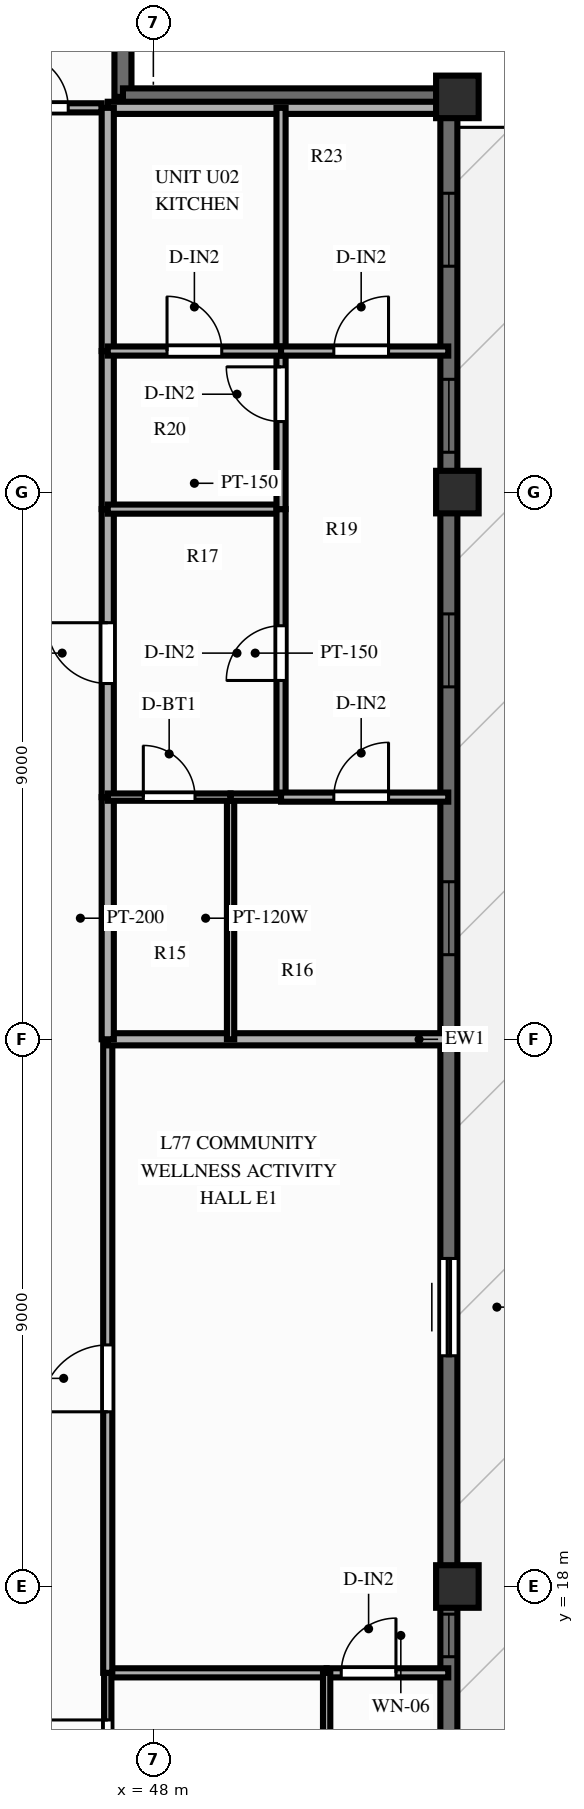
"""IFC4 building model, lengths in metres.
Left out: names, types, materials, properties, quantities, classifications, styles, units other than length and angle.
Written with IfcOpenShell. Run it as: python <this file> out.ifc"""

import sys

from ifc_helpers import new_model, si_unit, direction, frame, frame_2d, origin, origin_2d, place, context, subcontext, project, spatial, rectangle, extrude, source, transform, mapped, element, fill, save


model = new_model("IFC4")
c1 = context("Model", 3, precision=1e-05, world=origin(), true_north=direction((0.0, 1.0)))
c2 = subcontext(c1, "Body", "Model", "MODEL_VIEW")
j1 = project(units=[si_unit("LENGTHUNIT", "METRE"), si_unit("PLANEANGLEUNIT", "RADIAN")], contexts=[c1])
p1 = place(None, origin())
s1 = spatial("IfcSite", under=j1, at=p1, CompositionType="ELEMENT")
p2 = place(p1, origin())
s2 = spatial("IfcBuilding", under=s1, at=p2, CompositionType="ELEMENT")
p3 = place(p2, frame((0.0, 0.0, 249.0)))
s3 = spatial("IfcBuildingStorey", under=s2, at=p3, CompositionType="ELEMENT", Elevation=249.0)
m1 = source(origin(), c2, "Body", "SweptSolid", [
    extrude(rectangle(XDim=0.7, YDim=0.7, at=origin_2d()), origin(), (0.0, 0.0, 1.0), 3.2),
])
for number, where, z_axis, x_axis in (
    (1, (53.0, 18.0, 0.0), (0.0, 0.0, 1.0), (1.0, 0.0, 0.0)),
    (2, (53.0, 36.0, 0.0), (0.0, 0.0, 1.0), (1.0, 0.0, 0.0)),
    (3, (53.0, 42.5, 0.0), (0.0, 0.0, 1.0), (1.0, 0.0, 0.0)),
):
    element("IfcColumn", number, at=place(p3, frame(where, z_axis=z_axis, x_axis=x_axis)), inside=s3, PredefinedType="COLUMN", context=c2, shape_type="MappedRepresentation", body=[
        mapped(m1, transform((0.0, 0.0, 0.0), scale=1.0)),
    ])
p4 = place(p3, frame((52.86, 11.5, 0.0), z_axis=(0.0, 0.0, 1.0), x_axis=(0.0, 1.0, 0.0)))
e4 = element("IfcWall", 4, at=p4, inside=s3, PredefinedType="SOLIDWALL", context=c2, shape_type="SweptSolid", body=[
    extrude(rectangle(XDim=31.0, YDim=0.28, at=frame_2d((15.5, 0.0))), origin(), (0.0, 0.0, 1.0), 2.48),
])
p5 = place(p4, frame((2.035, 0.0, 0.25)))
e5 = element("IfcOpeningElement", 5, at=p5, cuts=e4, PredefinedType="OPENING", context=c2, shape_type="SweptSolid", body=[
    extrude(rectangle(XDim=1.2, YDim=1.5, at=frame_2d((0.6, 0.75))), frame((0.0, 0.152, 0.0), z_axis=(0.0, -1.0, 0.0), x_axis=(1.0, 0.0, 0.0)), (0.0, 0.0, 1.0), 0.304),
])
p6 = place(p4, frame((5.345, 0.0, 0.25)))
e6 = element("IfcOpeningElement", 6, at=p6, cuts=e4, PredefinedType="OPENING", context=c2, shape_type="SweptSolid", body=[
    extrude(rectangle(XDim=0.7, YDim=1.5, at=frame_2d((0.35, 0.75))), frame((0.0, 0.152, 0.0), z_axis=(0.0, -1.0, 0.0), x_axis=(1.0, 0.0, 0.0)), (0.0, 0.0, 1.0), 0.304),
])
p7 = place(p4, frame((11.895, 0.0, 0.0), z_axis=(0.0, 0.0, 1.0), x_axis=(-1.0, 0.0, 0.0)))
e7 = element("IfcOpeningElement", 7, at=p7, cuts=e4, PredefinedType="OPENING", context=c2, shape_type="SweptSolid", body=[
    extrude(rectangle(XDim=1.6, YDim=2.15, at=frame_2d((0.8, 1.075))), frame((0.0, 0.152, 0.0), z_axis=(0.0, -1.0, 0.0), x_axis=(1.0, 0.0, 0.0)), (0.0, 0.0, 1.0), 0.304),
])
p8 = place(p4, frame((16.892, 0.0, 0.25)))
e8 = element("IfcOpeningElement", 8, at=p8, cuts=e4, PredefinedType="OPENING", context=c2, shape_type="SweptSolid", body=[
    extrude(rectangle(XDim=1.2, YDim=1.5, at=frame_2d((0.6, 0.75))), frame((0.0, 0.152, 0.0), z_axis=(0.0, -1.0, 0.0), x_axis=(1.0, 0.0, 0.0)), (0.0, 0.0, 1.0), 0.304),
])
p9 = place(p4, frame((21.297, 0.0, 0.25)))
e9 = element("IfcOpeningElement", 9, at=p9, cuts=e4, PredefinedType="OPENING", context=c2, shape_type="SweptSolid", body=[
    extrude(rectangle(XDim=1.2, YDim=1.5, at=frame_2d((0.6, 0.75))), frame((0.0, 0.152, 0.0), z_axis=(0.0, -1.0, 0.0), x_axis=(1.0, 0.0, 0.0)), (0.0, 0.0, 1.0), 0.304),
])
p10 = place(p4, frame((25.155, 0.0, 0.25)))
e10 = element("IfcOpeningElement", 10, at=p10, cuts=e4, PredefinedType="OPENING", context=c2, shape_type="SweptSolid", body=[
    extrude(rectangle(XDim=1.2, YDim=1.5, at=frame_2d((0.6, 0.75))), frame((0.0, 0.152, 0.0), z_axis=(0.0, -1.0, 0.0), x_axis=(1.0, 0.0, 0.0)), (0.0, 0.0, 1.0), 0.304),
])
p11 = place(p4, frame((28.215, 0.0, 0.25)))
e11 = element("IfcOpeningElement", 11, at=p11, cuts=e4, PredefinedType="OPENING", context=c2, shape_type="SweptSolid", body=[
    extrude(rectangle(XDim=1.2, YDim=1.5, at=frame_2d((0.6, 0.75))), frame((0.0, 0.152, 0.0), z_axis=(0.0, -1.0, 0.0), x_axis=(1.0, 0.0, 0.0)), (0.0, 0.0, 1.0), 0.304),
])
for number, where, z_axis, x_axis in (
    (12, (47.5, 42.5, 0.0), (0.0, 0.0, 1.0), (0.0, 1.0, 0.0)),
    (13, (47.5, 42.5, 0.0), (0.0, 0.0, 1.0), (1.0, 0.0, 0.0)),
):
    element("IfcWall", number, at=place(p3, frame(where, z_axis=z_axis, x_axis=x_axis)), inside=s3, PredefinedType="SOLIDWALL", context=c2, shape_type="SweptSolid", body=[
        extrude(rectangle(XDim=5.42, YDim=0.28, at=frame_2d((2.71, 0.0))), origin(), (0.0, 0.0, 1.0), 2.48),
    ])
p12 = place(p3, frame((44.82, 42.32, 0.0), z_axis=(0.0, 0.0, 1.0), x_axis=(1.0, 0.0, 0.0)))
e14 = element("IfcWall", 14, at=p12, inside=s3, PredefinedType="PARTITIONING", context=c2, shape_type="SweptSolid", body=[
    extrude(rectangle(XDim=2.33, YDim=0.15, at=frame_2d((1.165, 0.0))), origin(), (0.0, 0.0, 1.0), 2.88),
])
p13 = place(p12, frame((0.88, 0.0, 0.0)))
e15 = element("IfcOpeningElement", 15, at=p13, cuts=e14, PredefinedType="OPENING", context=c2, shape_type="SweptSolid", body=[
    extrude(rectangle(XDim=0.9, YDim=2.1, at=frame_2d((0.45, 1.05))), frame((0.0, 0.087, 0.0), z_axis=(0.0, -1.0, 0.0), x_axis=(1.0, 0.0, 0.0)), (0.0, 0.0, 1.0), 0.174),
])
p14 = place(p3, frame((47.25, 42.32, 0.0), z_axis=(0.0, 0.0, 1.0), x_axis=(1.0, 0.0, 0.0)))
e16 = element("IfcWall", 16, at=p14, inside=s3, PredefinedType="PARTITIONING", context=c2, shape_type="SweptSolid", body=[
    extrude(rectangle(XDim=5.6, YDim=0.2, at=frame_2d((2.8, 0.0))), origin(), (0.0, 0.0, 1.0), 2.88),
])
p15 = place(p3, frame((47.25, 16.58, 0.0), z_axis=(0.0, 0.0, 1.0), x_axis=(1.0, 0.0, 0.0)))
e17 = element("IfcWall", 17, at=p15, inside=s3, PredefinedType="PARTITIONING", context=c2, shape_type="SweptSolid", body=[
    extrude(rectangle(XDim=3.6, YDim=0.15, at=frame_2d((1.8, 0.0))), origin(), (0.0, 0.0, 1.0), 2.88),
])
p16 = place(p3, frame((50.85, 16.58, 0.0), z_axis=(0.0, 0.0, 1.0), x_axis=(1.0, 0.0, 0.0)))
e18 = element("IfcWall", 18, at=p16, inside=s3, PredefinedType="PARTITIONING", context=c2, shape_type="SweptSolid", body=[
    extrude(rectangle(XDim=2.0, YDim=0.15, at=frame_2d((1.0, 0.0))), origin(), (0.0, 0.0, 1.0), 2.88),
])
p17 = place(p16, frame((0.24, 0.0, 0.0)))
e19 = element("IfcOpeningElement", 19, at=p17, cuts=e18, PredefinedType="OPENING", context=c2, shape_type="SweptSolid", body=[
    extrude(rectangle(XDim=0.9, YDim=2.1, at=frame_2d((0.45, 1.05))), frame((0.0, 0.087, 0.0), z_axis=(0.0, -1.0, 0.0), x_axis=(1.0, 0.0, 0.0)), (0.0, 0.0, 1.0), 0.174),
])
p18 = place(p3, frame((50.85, 11.68, 0.0), z_axis=(0.0, 0.0, 1.0), x_axis=(0.0, 1.0, 0.0)))
e20 = element("IfcWall", 20, at=p18, inside=s3, PredefinedType="PARTITIONING", context=c2, shape_type="SweptSolid", body=[
    extrude(rectangle(XDim=4.9, YDim=0.12, at=frame_2d((2.45, 0.0))), origin(), (0.0, 0.0, 1.0), 2.88),
])
p19 = place(p3, frame((47.25, 14.03, 0.0), z_axis=(0.0, 0.0, 1.0), x_axis=(0.0, 1.0, 0.0)))
e21 = element("IfcWall", 21, at=p19, inside=s3, PredefinedType="PARTITIONING", context=c2, shape_type="SweptSolid", body=[
    extrude(rectangle(XDim=2.55, YDim=0.12, at=frame_2d((1.275, 0.0))), origin(), (0.0, 0.0, 1.0), 2.88),
])
p20 = place(p19, frame((0.775, 0.0, 0.0)))
e22 = element("IfcOpeningElement", 22, at=p20, cuts=e21, PredefinedType="OPENING", context=c2, shape_type="SweptSolid", body=[
    extrude(rectangle(XDim=1.0, YDim=2.1, at=frame_2d((0.5, 1.05))), frame((0.0, 0.072, 0.0), z_axis=(0.0, -1.0, 0.0), x_axis=(1.0, 0.0, 0.0)), (0.0, 0.0, 1.0), 0.144),
])
p21 = place(p3, frame((47.25, 16.58, 0.0), z_axis=(0.0, 0.0, 1.0), x_axis=(0.0, 1.0, 0.0)))
e23 = element("IfcWall", 23, at=p21, inside=s3, PredefinedType="PARTITIONING", context=c2, shape_type="SweptSolid", body=[
    extrude(rectangle(XDim=10.42, YDim=0.15, at=frame_2d((5.21, 0.0))), origin(), (0.0, 0.0, 1.0), 2.88),
])
p22 = place(p21, frame((4.293, 0.0, 0.0)))
e24 = element("IfcOpeningElement", 24, at=p22, cuts=e23, PredefinedType="OPENING", context=c2, shape_type="SweptSolid", body=[
    extrude(rectangle(XDim=1.1, YDim=2.15, at=frame_2d((0.55, 1.075))), frame((0.0, 0.087, 0.0), z_axis=(0.0, -1.0, 0.0), x_axis=(1.0, 0.0, 0.0)), (0.0, 0.0, 1.0), 0.174),
])
p23 = place(p3, frame((47.25, 27.0, 0.0), z_axis=(0.0, 0.0, 1.0), x_axis=(1.0, 0.0, 0.0)))
e25 = element("IfcWall", 25, at=p23, inside=s3, PredefinedType="PARTITIONING", context=c2, shape_type="SweptSolid", body=[
    extrude(rectangle(XDim=5.6, YDim=0.2, at=frame_2d((2.8, 0.0))), origin(), (0.0, 0.0, 1.0), 2.88),
])
p24 = place(p3, frame((47.25, 27.0, 0.0), z_axis=(0.0, 0.0, 1.0), x_axis=(0.0, 1.0, 0.0)))
e26 = element("IfcWall", 26, at=p24, inside=s3, PredefinedType="PARTITIONING", context=c2, shape_type="SweptSolid", body=[
    extrude(rectangle(XDim=3.983, YDim=0.2, at=frame_2d((1.992, 0.0))), origin(), (0.0, 0.0, 1.0), 2.88),
])
p25 = place(p3, frame((47.25, 30.983, 0.0), z_axis=(0.0, 0.0, 1.0), x_axis=(0.0, 1.0, 0.0)))
e27 = element("IfcWall", 27, at=p25, inside=s3, PredefinedType="PARTITIONING", context=c2, shape_type="SweptSolid", body=[
    extrude(rectangle(XDim=4.737, YDim=0.2, at=frame_2d((2.368, 0.0))), origin(), (0.0, 0.0, 1.0), 2.88),
])
p26 = place(p25, frame((1.868, 0.0, 0.0)))
e28 = element("IfcOpeningElement", 28, at=p26, cuts=e27, PredefinedType="OPENING", context=c2, shape_type="SweptSolid", body=[
    extrude(rectangle(XDim=1.0, YDim=2.15, at=frame_2d((0.5, 1.075))), frame((0.0, 0.112, 0.0), z_axis=(0.0, -1.0, 0.0), x_axis=(1.0, 0.0, 0.0)), (0.0, 0.0, 1.0), 0.224),
])
p27 = place(p3, frame((47.25, 35.72, 0.0), z_axis=(0.0, 0.0, 1.0), x_axis=(0.0, 1.0, 0.0)))
e29 = element("IfcWall", 29, at=p27, inside=s3, PredefinedType="PARTITIONING", context=c2, shape_type="SweptSolid", body=[
    extrude(rectangle(XDim=2.6, YDim=0.2, at=frame_2d((1.3, 0.0))), origin(), (0.0, 0.0, 1.0), 2.88),
])
p28 = place(p3, frame((47.25, 35.72, 0.0), z_axis=(0.0, 0.0, 1.0), x_axis=(1.0, 0.0, 0.0)))
e30 = element("IfcWall", 30, at=p28, inside=s3, PredefinedType="PARTITIONING", context=c2, shape_type="SweptSolid", body=[
    extrude(rectangle(XDim=2.85, YDim=0.15, at=frame_2d((1.425, 0.0))), origin(), (0.0, 0.0, 1.0), 2.88),
])
p29 = place(p3, frame((50.1, 30.983, 0.0), z_axis=(0.0, 0.0, 1.0), x_axis=(0.0, 1.0, 0.0)))
e31 = element("IfcWall", 31, at=p29, inside=s3, PredefinedType="PARTITIONING", context=c2, shape_type="SweptSolid", body=[
    extrude(rectangle(XDim=4.737, YDim=0.15, at=frame_2d((2.368, 0.0))), origin(), (0.0, 0.0, 1.0), 2.88),
])
p30 = place(p29, frame((1.918, 0.0, 0.0)))
e32 = element("IfcOpeningElement", 32, at=p30, cuts=e31, PredefinedType="OPENING", context=c2, shape_type="SweptSolid", body=[
    extrude(rectangle(XDim=0.9, YDim=2.1, at=frame_2d((0.45, 1.05))), frame((0.0, 0.087, 0.0), z_axis=(0.0, -1.0, 0.0), x_axis=(1.0, 0.0, 0.0)), (0.0, 0.0, 1.0), 0.174),
])
p31 = place(p3, frame((50.1, 35.72, 0.0), z_axis=(0.0, 0.0, 1.0), x_axis=(0.0, 1.0, 0.0)))
e33 = element("IfcWall", 33, at=p31, inside=s3, PredefinedType="PARTITIONING", context=c2, shape_type="SweptSolid", body=[
    extrude(rectangle(XDim=2.6, YDim=0.15, at=frame_2d((1.3, 0.0))), origin(), (0.0, 0.0, 1.0), 2.88),
])
p32 = place(p31, frame((1.44, 0.0, 0.0)))
e34 = element("IfcOpeningElement", 34, at=p32, cuts=e33, PredefinedType="OPENING", context=c2, shape_type="SweptSolid", body=[
    extrude(rectangle(XDim=0.9, YDim=2.1, at=frame_2d((0.45, 1.05))), frame((0.0, 0.087, 0.0), z_axis=(0.0, -1.0, 0.0), x_axis=(1.0, 0.0, 0.0)), (0.0, 0.0, 1.0), 0.174),
])
p33 = place(p3, frame((47.25, 38.32, 0.0), z_axis=(0.0, 0.0, 1.0), x_axis=(0.0, 1.0, 0.0)))
e35 = element("IfcWall", 35, at=p33, inside=s3, PredefinedType="PARTITIONING", context=c2, shape_type="SweptSolid", body=[
    extrude(rectangle(XDim=4.0, YDim=0.2, at=frame_2d((2.0, 0.0))), origin(), (0.0, 0.0, 1.0), 2.88),
])
p34 = place(p3, frame((49.27, 27.0, 0.0), z_axis=(0.0, 0.0, 1.0), x_axis=(0.0, 1.0, 0.0)))
e36 = element("IfcWall", 36, at=p34, inside=s3, PredefinedType="PARTITIONING", context=c2, shape_type="SweptSolid", body=[
    extrude(rectangle(XDim=3.983, YDim=0.12, at=frame_2d((1.992, 0.0))), origin(), (0.0, 0.0, 1.0), 2.59),
])
p35 = place(p3, frame((50.1, 38.32, 0.0), z_axis=(0.0, 0.0, 1.0), x_axis=(0.0, 1.0, 0.0)))
e37 = element("IfcWall", 37, at=p35, inside=s3, PredefinedType="PARTITIONING", context=c2, shape_type="SweptSolid", body=[
    extrude(rectangle(XDim=4.0, YDim=0.15, at=frame_2d((2.0, 0.0))), origin(), (0.0, 0.0, 1.0), 2.88),
])
p36 = place(p3, frame((47.25, 30.983, 0.0), z_axis=(0.0, 0.0, 1.0), x_axis=(1.0, 0.0, 0.0)))
e38 = element("IfcWall", 38, at=p36, inside=s3, PredefinedType="PARTITIONING", context=c2, shape_type="SweptSolid", body=[
    extrude(rectangle(XDim=2.02, YDim=0.12, at=frame_2d((1.01, 0.0))), origin(), (0.0, 0.0, 1.0), 2.88),
])
p37 = place(p36, frame((0.585, 0.0, 0.0)))
e39 = element("IfcOpeningElement", 39, at=p37, cuts=e38, PredefinedType="OPENING", context=c2, shape_type="SweptSolid", body=[
    extrude(rectangle(XDim=0.85, YDim=2.05, at=frame_2d((0.425, 1.025))), frame((0.0, 0.072, 0.0), z_axis=(0.0, -1.0, 0.0), x_axis=(1.0, 0.0, 0.0)), (0.0, 0.0, 1.0), 0.144),
])
p38 = place(p3, frame((49.27, 30.983, 0.0), z_axis=(0.0, 0.0, 1.0), x_axis=(1.0, 0.0, 0.0)))
e40 = element("IfcWall", 40, at=p38, inside=s3, PredefinedType="PARTITIONING", context=c2, shape_type="SweptSolid", body=[
    extrude(rectangle(XDim=0.83, YDim=0.12, at=frame_2d((0.415, 0.0))), origin(), (0.0, 0.0, 1.0), 2.88),
])
p39 = place(p3, frame((50.1, 30.983, 0.0), z_axis=(0.0, 0.0, 1.0), x_axis=(1.0, 0.0, 0.0)))
e41 = element("IfcWall", 41, at=p39, inside=s3, PredefinedType="PARTITIONING", context=c2, shape_type="SweptSolid", body=[
    extrude(rectangle(XDim=2.75, YDim=0.15, at=frame_2d((1.375, 0.0))), origin(), (0.0, 0.0, 1.0), 2.88),
])
p40 = place(p39, frame((0.868, 0.0, 0.0)))
e42 = element("IfcOpeningElement", 42, at=p40, cuts=e41, PredefinedType="OPENING", context=c2, shape_type="SweptSolid", body=[
    extrude(rectangle(XDim=0.9, YDim=2.1, at=frame_2d((0.45, 1.05))), frame((0.0, 0.087, 0.0), z_axis=(0.0, -1.0, 0.0), x_axis=(1.0, 0.0, 0.0)), (0.0, 0.0, 1.0), 0.174),
])
p41 = place(p3, frame((47.25, 38.32, 0.0), z_axis=(0.0, 0.0, 1.0), x_axis=(1.0, 0.0, 0.0)))
e43 = element("IfcWall", 43, at=p41, inside=s3, PredefinedType="PARTITIONING", context=c2, shape_type="SweptSolid", body=[
    extrude(rectangle(XDim=2.85, YDim=0.15, at=frame_2d((1.425, 0.0))), origin(), (0.0, 0.0, 1.0), 2.88),
])
p42 = place(p41, frame((0.975, 0.0, 0.0)))
e44 = element("IfcOpeningElement", 44, at=p42, cuts=e43, PredefinedType="OPENING", context=c2, shape_type="SweptSolid", body=[
    extrude(rectangle(XDim=0.9, YDim=2.1, at=frame_2d((0.45, 1.05))), frame((0.0, 0.087, 0.0), z_axis=(0.0, -1.0, 0.0), x_axis=(1.0, 0.0, 0.0)), (0.0, 0.0, 1.0), 0.174),
])
p43 = place(p3, frame((50.1, 38.32, 0.0), z_axis=(0.0, 0.0, 1.0), x_axis=(1.0, 0.0, 0.0)))
e45 = element("IfcWall", 45, at=p43, inside=s3, PredefinedType="PARTITIONING", context=c2, shape_type="SweptSolid", body=[
    extrude(rectangle(XDim=2.75, YDim=0.15, at=frame_2d((1.375, 0.0))), origin(), (0.0, 0.0, 1.0), 2.88),
])
p44 = place(p43, frame((0.868, 0.0, 0.0)))
e46 = element("IfcOpeningElement", 46, at=p44, cuts=e45, PredefinedType="OPENING", context=c2, shape_type="SweptSolid", body=[
    extrude(rectangle(XDim=0.9, YDim=2.1, at=frame_2d((0.45, 1.05))), frame((0.0, 0.087, 0.0), z_axis=(0.0, -1.0, 0.0), x_axis=(1.0, 0.0, 0.0)), (0.0, 0.0, 1.0), 0.174),
])
m2 = source(origin(), c2, "Body", "SweptSolid", [
    extrude(rectangle(XDim=0.7, YDim=1.5, at=frame_2d((0.35, 0.75))), frame((0.0, 0.03, 0.0), z_axis=(0.0, -1.0, 0.0), x_axis=(1.0, 0.0, 0.0)), (0.0, 0.0, 1.0), 0.06),
])
p45 = place(p6, origin())
e47 = element("IfcWindow", 47, at=p45, inside=s3, PartitioningType="SINGLE_PANEL", PredefinedType="WINDOW", context=c2, shape_type="MappedRepresentation", body=[
    mapped(m2, transform((0.0, 0.0, 0.0), scale=1.0)),
])
fill(e6, e47)
m3 = source(origin(), c2, "Body", "SweptSolid", [
    extrude(rectangle(XDim=1.6, YDim=2.15, at=frame_2d((0.8, 1.075))), frame((0.0, 0.025, 0.0), z_axis=(0.0, -1.0, 0.0), x_axis=(1.0, 0.0, 0.0)), (0.0, 0.0, 1.0), 0.05),
])
p46 = place(p7, origin())
e48 = element("IfcDoor", 48, at=p46, inside=s3, OperationType="SLIDING_TO_LEFT", PredefinedType="DOOR", context=c2, shape_type="MappedRepresentation", body=[
    mapped(m3, transform((0.0, 0.0, 0.0), scale=1.0)),
])
fill(e7, e48)
m4 = source(origin(), c2, "Body", "SweptSolid", [
    extrude(rectangle(XDim=1.2, YDim=1.5, at=frame_2d((0.6, 0.75))), frame((0.0, 0.03, 0.0), z_axis=(0.0, -1.0, 0.0), x_axis=(1.0, 0.0, 0.0)), (0.0, 0.0, 1.0), 0.06),
])
p47 = place(p8, origin())
e49 = element("IfcWindow", 49, at=p47, inside=s3, PartitioningType="SINGLE_PANEL", PredefinedType="WINDOW", context=c2, shape_type="MappedRepresentation", body=[
    mapped(m4, transform((0.0, 0.0, 0.0), scale=1.0)),
])
fill(e8, e49)
p48 = place(p9, origin())
e50 = element("IfcWindow", 50, at=p48, inside=s3, PartitioningType="SINGLE_PANEL", PredefinedType="WINDOW", context=c2, shape_type="MappedRepresentation", body=[
    mapped(m4, transform((0.0, 0.0, 0.0), scale=1.0)),
])
fill(e9, e50)
p49 = place(p10, origin())
e51 = element("IfcWindow", 51, at=p49, inside=s3, PartitioningType="SINGLE_PANEL", PredefinedType="WINDOW", context=c2, shape_type="MappedRepresentation", body=[
    mapped(m4, transform((0.0, 0.0, 0.0), scale=1.0)),
])
fill(e10, e51)
p50 = place(p11, origin())
e52 = element("IfcWindow", 52, at=p50, inside=s3, PartitioningType="SINGLE_PANEL", PredefinedType="WINDOW", context=c2, shape_type="MappedRepresentation", body=[
    mapped(m4, transform((0.0, 0.0, 0.0), scale=1.0)),
])
fill(e11, e52)
m5 = source(origin(), c2, "Body", "SweptSolid", [
    extrude(rectangle(XDim=0.9, YDim=2.1, at=frame_2d((0.45, 1.05))), frame((0.0, 0.025, 0.0), z_axis=(0.0, -1.0, 0.0), x_axis=(1.0, 0.0, 0.0)), (0.0, 0.0, 1.0), 0.05),
])
p51 = place(p13, origin())
e53 = element("IfcDoor", 53, at=p51, inside=s3, OperationType="SINGLE_SWING_LEFT", PredefinedType="DOOR", context=c2, shape_type="MappedRepresentation", body=[
    mapped(m5, transform((0.0, 0.0, 0.0), scale=1.0)),
])
fill(e15, e53)
p52 = place(p17, origin())
e54 = element("IfcDoor", 54, at=p52, inside=s3, OperationType="SINGLE_SWING_RIGHT", PredefinedType="DOOR", context=c2, shape_type="MappedRepresentation", body=[
    mapped(m5, transform((0.0, 0.0, 0.0), scale=1.0)),
])
fill(e19, e54)
m6 = source(origin(), c2, "Body", "SweptSolid", [
    extrude(rectangle(XDim=1.0, YDim=2.1, at=frame_2d((0.5, 1.05))), frame((0.0, 0.025, 0.0), z_axis=(0.0, -1.0, 0.0), x_axis=(1.0, 0.0, 0.0)), (0.0, 0.0, 1.0), 0.05),
])
p53 = place(p20, origin())
e55 = element("IfcDoor", 55, at=p53, inside=s3, OperationType="SINGLE_SWING_RIGHT", PredefinedType="DOOR", context=c2, shape_type="MappedRepresentation", body=[
    mapped(m6, transform((0.0, 0.0, 0.0), scale=1.0)),
])
fill(e22, e55)
m7 = source(origin(), c2, "Body", "SweptSolid", [
    extrude(rectangle(XDim=1.1, YDim=2.15, at=frame_2d((0.55, 1.075))), frame((0.0, 0.025, 0.0), z_axis=(0.0, -1.0, 0.0), x_axis=(1.0, 0.0, 0.0)), (0.0, 0.0, 1.0), 0.05),
])
p54 = place(p22, origin())
e56 = element("IfcDoor", 56, at=p54, inside=s3, OperationType="SINGLE_SWING_LEFT", PredefinedType="DOOR", context=c2, shape_type="MappedRepresentation", body=[
    mapped(m7, transform((0.0, 0.0, 0.0), scale=1.0)),
])
fill(e24, e56)
m8 = source(origin(), c2, "Body", "SweptSolid", [
    extrude(rectangle(XDim=1.0, YDim=2.15, at=frame_2d((0.5, 1.075))), frame((0.0, 0.025, 0.0), z_axis=(0.0, -1.0, 0.0), x_axis=(1.0, 0.0, 0.0)), (0.0, 0.0, 1.0), 0.05),
])
p55 = place(p26, origin())
e57 = element("IfcDoor", 57, at=p55, inside=s3, OperationType="SINGLE_SWING_RIGHT", PredefinedType="DOOR", context=c2, shape_type="MappedRepresentation", body=[
    mapped(m8, transform((0.0, 0.0, 0.0), scale=1.0)),
])
fill(e28, e57)
p56 = place(p30, origin())
e58 = element("IfcDoor", 58, at=p56, inside=s3, OperationType="SINGLE_SWING_LEFT", PredefinedType="DOOR", context=c2, shape_type="MappedRepresentation", body=[
    mapped(m5, transform((0.0, 0.0, 0.0), scale=1.0)),
])
fill(e32, e58)
p57 = place(p32, origin())
e59 = element("IfcDoor", 59, at=p57, inside=s3, OperationType="SINGLE_SWING_RIGHT", PredefinedType="DOOR", context=c2, shape_type="MappedRepresentation", body=[
    mapped(m5, transform((0.0, 0.0, 0.0), scale=1.0)),
])
fill(e34, e59)
m9 = source(origin(), c2, "Body", "SweptSolid", [
    extrude(rectangle(XDim=0.85, YDim=2.05, at=frame_2d((0.425, 1.025))), frame((0.0, 0.025, 0.0), z_axis=(0.0, -1.0, 0.0), x_axis=(1.0, 0.0, 0.0)), (0.0, 0.0, 1.0), 0.05),
])
p58 = place(p37, origin())
e60 = element("IfcDoor", 60, at=p58, inside=s3, OperationType="SINGLE_SWING_LEFT", PredefinedType="DOOR", context=c2, shape_type="MappedRepresentation", body=[
    mapped(m9, transform((0.0, 0.0, 0.0), scale=1.0)),
])
fill(e39, e60)
p59 = place(p40, origin())
e61 = element("IfcDoor", 61, at=p59, inside=s3, OperationType="SINGLE_SWING_RIGHT", PredefinedType="DOOR", context=c2, shape_type="MappedRepresentation", body=[
    mapped(m5, transform((0.0, 0.0, 0.0), scale=1.0)),
])
fill(e42, e61)
p60 = place(p42, origin())
e62 = element("IfcDoor", 62, at=p60, inside=s3, OperationType="SINGLE_SWING_LEFT", PredefinedType="DOOR", context=c2, shape_type="MappedRepresentation", body=[
    mapped(m5, transform((0.0, 0.0, 0.0), scale=1.0)),
])
fill(e44, e62)
p61 = place(p44, origin())
e63 = element("IfcDoor", 63, at=p61, inside=s3, OperationType="SINGLE_SWING_RIGHT", PredefinedType="DOOR", context=c2, shape_type="MappedRepresentation", body=[
    mapped(m5, transform((0.0, 0.0, 0.0), scale=1.0)),
])
fill(e46, e63)
save(model, sys.argv[1])
